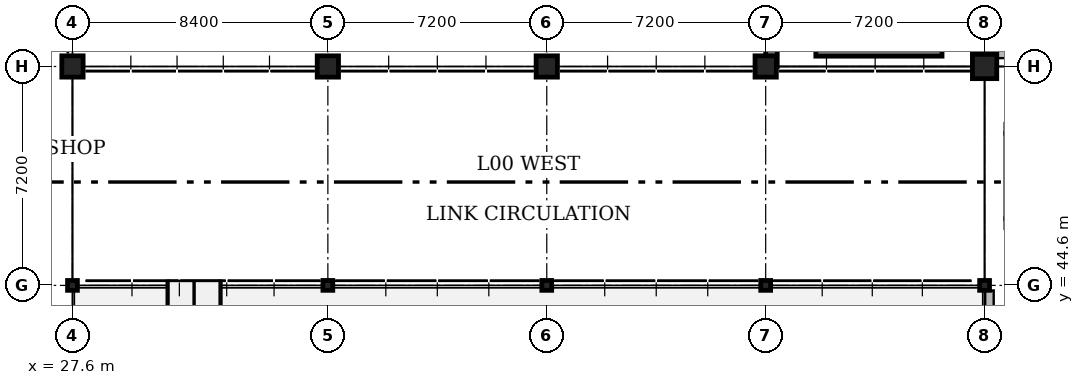
"""IFC4 building model, lengths in metres.
Left out: names, types, materials, properties, quantities, classifications, styles, units other than length and angle.
Written with IfcOpenShell. Run it as: python <this file> out.ifc"""

import sys

from ifc_helpers import new_model, si_unit, direction, frame, frame_2d, origin, origin_2d, place, context, subcontext, project, spatial, rectangle, hollow_circle, extrude, element, save


model = new_model("IFC4")
c1 = context("Model", 3, precision=1e-05, world=origin(), true_north=direction((0.0, 1.0)))
c2 = subcontext(c1, "Body", "Model", "MODEL_VIEW")
j1 = project(units=[si_unit("LENGTHUNIT", "METRE"), si_unit("PLANEANGLEUNIT", "RADIAN")], contexts=[c1])
p1 = place(None, origin())
s1 = spatial("IfcSite", under=j1, at=p1, CompositionType="ELEMENT")
p2 = place(p1, origin())
s2 = spatial("IfcBuilding", under=s1, at=p2, CompositionType="ELEMENT")
p3 = place(p2, origin())
s3 = spatial("IfcBuildingStorey", under=s2, at=p3, CompositionType="ELEMENT", Elevation=0.0)
p4 = place(p3, frame((27.6, 44.6, 0.0), z_axis=(0.0, 0.0, 1.0), x_axis=(1.0, 0.0, 0.0)))
e1 = element("IfcColumn", 1, at=p4, inside=s3, PredefinedType="COLUMN", context=c2, shape_type="SweptSolid", body=[
    extrude(hollow_circle(Radius=0.162, WallThickness=0.012, at=origin_2d()), origin(), (0.0, 0.0, 1.0), 4.8),
])
p5 = place(p3, frame((27.6, 51.8, 0.0), z_axis=(0.0, 0.0, 1.0), x_axis=(1.0, 0.0, 0.0)))
e2 = element("IfcColumn", 2, at=p5, inside=s3, PredefinedType="COLUMN", context=c2, shape_type="SweptSolid", body=[
    extrude(rectangle(XDim=0.7, YDim=0.7, at=origin_2d()), origin(), (0.0, 0.0, 1.0), 4.8),
])
p6 = place(p3, frame((36.0, 44.6, 0.0), z_axis=(0.0, 0.0, 1.0), x_axis=(1.0, 0.0, 0.0)))
e3 = element("IfcColumn", 3, at=p6, inside=s3, PredefinedType="COLUMN", context=c2, shape_type="SweptSolid", body=[
    extrude(hollow_circle(Radius=0.162, WallThickness=0.012, at=origin_2d()), origin(), (0.0, 0.0, 1.0), 4.8),
])
p7 = place(p3, frame((36.0, 51.8, 0.0), z_axis=(0.0, 0.0, 1.0), x_axis=(1.0, 0.0, 0.0)))
e4 = element("IfcColumn", 4, at=p7, inside=s3, PredefinedType="COLUMN", context=c2, shape_type="SweptSolid", body=[
    extrude(rectangle(XDim=0.7, YDim=0.7, at=origin_2d()), origin(), (0.0, 0.0, 1.0), 4.8),
])
p8 = place(p3, frame((43.2, 44.6, 0.0), z_axis=(0.0, 0.0, 1.0), x_axis=(1.0, 0.0, 0.0)))
e5 = element("IfcColumn", 5, at=p8, inside=s3, PredefinedType="COLUMN", context=c2, shape_type="SweptSolid", body=[
    extrude(hollow_circle(Radius=0.162, WallThickness=0.012, at=origin_2d()), origin(), (0.0, 0.0, 1.0), 4.8),
])
p9 = place(p3, frame((43.2, 51.8, 0.0), z_axis=(0.0, 0.0, 1.0), x_axis=(1.0, 0.0, 0.0)))
e6 = element("IfcColumn", 6, at=p9, inside=s3, PredefinedType="COLUMN", context=c2, shape_type="SweptSolid", body=[
    extrude(rectangle(XDim=0.7, YDim=0.7, at=origin_2d()), origin(), (0.0, 0.0, 1.0), 4.8),
])
p10 = place(p3, frame((50.4, 44.6, 0.0), z_axis=(0.0, 0.0, 1.0), x_axis=(1.0, 0.0, 0.0)))
e7 = element("IfcColumn", 7, at=p10, inside=s3, PredefinedType="COLUMN", context=c2, shape_type="SweptSolid", body=[
    extrude(hollow_circle(Radius=0.162, WallThickness=0.012, at=origin_2d()), origin(), (0.0, 0.0, 1.0), 4.8),
])
p11 = place(p3, frame((50.4, 51.8, 0.0), z_axis=(0.0, 0.0, 1.0), x_axis=(1.0, 0.0, 0.0)))
e8 = element("IfcColumn", 8, at=p11, inside=s3, PredefinedType="COLUMN", context=c2, shape_type="SweptSolid", body=[
    extrude(rectangle(XDim=0.7, YDim=0.7, at=origin_2d()), origin(), (0.0, 0.0, 1.0), 4.8),
])
p12 = place(p3, frame((57.6, 44.6, 0.0), z_axis=(0.0, 0.0, 1.0), x_axis=(1.0, 0.0, 0.0)))
e9 = element("IfcColumn", 9, at=p12, inside=s3, PredefinedType="COLUMN", context=c2, shape_type="SweptSolid", body=[
    extrude(hollow_circle(Radius=0.162, WallThickness=0.012, at=origin_2d()), origin(), (0.0, 0.0, 1.0), 4.8),
])
p13 = place(p3, frame((57.6, 51.8, 0.0), z_axis=(0.0, 0.0, 1.0), x_axis=(1.0, 0.0, 0.0)))
e10 = element("IfcColumn", 10, at=p13, inside=s3, PredefinedType="COLUMN", context=c2, shape_type="SweptSolid", body=[
    extrude(rectangle(XDim=0.8, YDim=0.8, at=origin_2d()), origin(), (0.0, 0.0, 1.0), 4.8),
])
p14 = place(p3, frame((56.2, 52.315, 0.0), z_axis=(0.0, 0.0, 1.0), x_axis=(-1.0, 0.0, 0.0)))
e11 = element("IfcWall", 11, at=p14, inside=s3, PredefinedType="SOLIDWALL", context=c2, shape_type="SweptSolid", body=[
    extrude(rectangle(XDim=4.15, YDim=0.35, at=frame_2d((2.075, 0.0))), origin(), (0.0, 0.0, 1.0), 4.8),
])
p15 = place(p3, frame((57.76, 37.78, 0.0), z_axis=(0.0, 0.0, 1.0), x_axis=(0.0, 1.0, 0.0)))
e12 = element("IfcWall", 12, at=p15, inside=s3, PredefinedType="SOLIDWALL", context=c2, shape_type="SweptSolid", body=[
    extrude(rectangle(XDim=6.653, YDim=0.28, at=frame_2d((3.327, 0.0))), origin(), (0.0, 0.0, 1.0), 3.873),
])
p16 = place(p15, frame((0.928, 0.0, 0.95)))
e13 = element("IfcOpeningElement", 13, at=p16, cuts=e12, PredefinedType="OPENING", context=c2, shape_type="SweptSolid", body=[
    extrude(rectangle(XDim=1.47, YDim=1.95, at=frame_2d((0.735, 0.975))), frame((0.0, 0.16, 0.0), z_axis=(0.0, -1.0, 0.0), x_axis=(1.0, 0.0, 0.0)), (0.0, 0.0, 1.0), 0.32),
])
p17 = place(p15, frame((4.255, 0.0, 0.95)))
e14 = element("IfcOpeningElement", 14, at=p17, cuts=e12, PredefinedType="OPENING", context=c2, shape_type="SweptSolid", body=[
    extrude(rectangle(XDim=1.47, YDim=1.95, at=frame_2d((0.735, 0.975))), frame((0.0, 0.16, 0.0), z_axis=(0.0, -1.0, 0.0), x_axis=(1.0, 0.0, 0.0)), (0.0, 0.0, 1.0), 0.32),
])
p18 = place(p3, frame((50.59, 51.8, 0.0), z_axis=(0.0, 0.0, 1.0), x_axis=(0.0, 1.0, 0.0)))
e15 = element("IfcWall", 15, at=p18, inside=s3, PredefinedType="SOLIDWALL", context=c2, shape_type="SweptSolid", body=[
    extrude(rectangle(XDim=36.0, YDim=0.38, at=frame_2d((18.0, 0.0))), origin(), (0.0, 0.0, 1.0), 4.54),
])
p19 = place(p18, frame((14.8, 0.0, 0.0)))
e16 = element("IfcOpeningElement", 16, at=p19, cuts=e15, PredefinedType="OPENING", context=c2, shape_type="SweptSolid", body=[
    extrude(rectangle(XDim=1.8, YDim=2.2, at=frame_2d((0.9, 1.1))), frame((0.0, 0.21, 0.0), z_axis=(0.0, -1.0, 0.0), x_axis=(1.0, 0.0, 0.0)), (0.0, 0.0, 1.0), 0.42),
])
p20 = place(p18, frame((24.8, 0.0, 0.0)))
e17 = element("IfcOpeningElement", 17, at=p20, cuts=e15, PredefinedType="OPENING", context=c2, shape_type="SweptSolid", body=[
    extrude(rectangle(XDim=1.8, YDim=2.2, at=frame_2d((0.9, 1.1))), frame((0.0, 0.21, 0.0), z_axis=(0.0, -1.0, 0.0), x_axis=(1.0, 0.0, 0.0)), (0.0, 0.0, 1.0), 0.42),
])
p21 = place(p3, frame((62.58, 52.2, 0.0), z_axis=(0.0, 0.0, 1.0), x_axis=(-1.0, 0.0, 0.0)))
e18 = element("IfcWall", 18, at=p21, inside=s3, PredefinedType="PARTITIONING", context=c2, shape_type="SweptSolid", body=[
    extrude(rectangle(XDim=4.56, YDim=0.25, at=frame_2d((2.28, 0.0))), origin(), (0.0, 0.0, 1.0), 4.54),
])
save(model, sys.argv[1])
